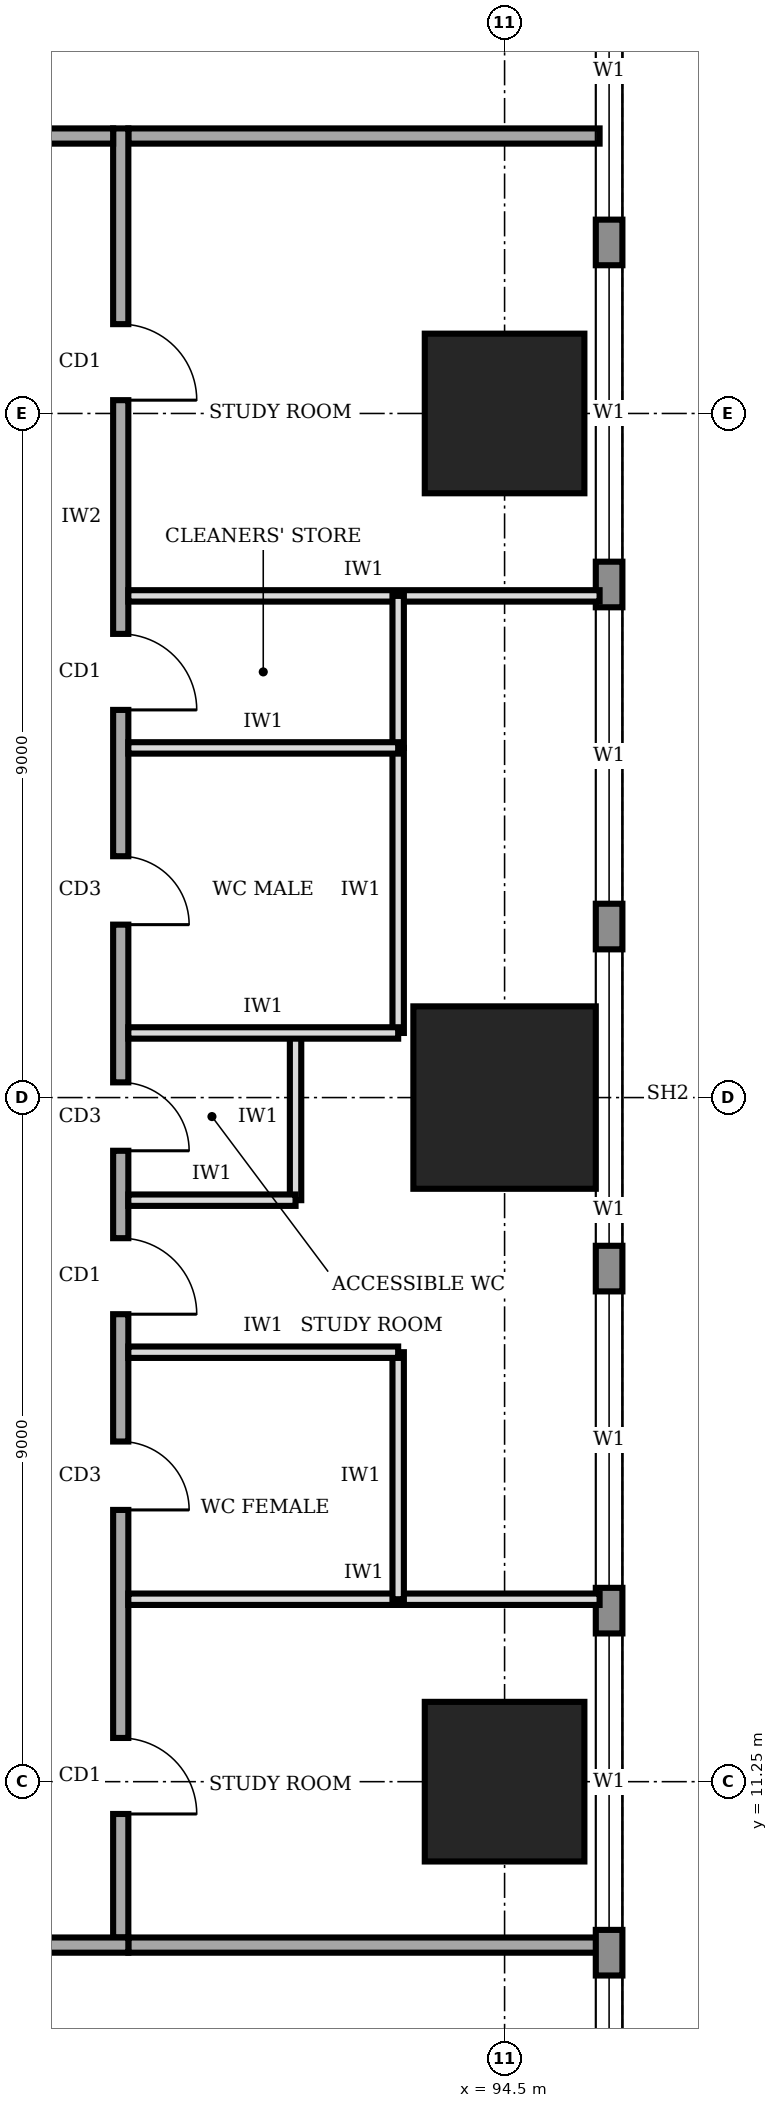
"""IFC4 building model, lengths in metres.
Left out: names, types, materials, properties, quantities, classifications, styles, units other than length and angle.
Written with IfcOpenShell. Run it as: python <this file> out.ifc"""

import sys

from ifc_helpers import new_model, si_unit, direction, frame, frame_2d, origin, origin_2d, place, context, subcontext, project, spatial, rectangle, extrude, element, fill, save


model = new_model("IFC4")
c1 = context("Model", 3, precision=1e-05, world=origin(), true_north=direction((0.0, 1.0)))
c2 = subcontext(c1, "Body", "Model", "MODEL_VIEW")
j1 = project(units=[si_unit("LENGTHUNIT", "METRE"), si_unit("PLANEANGLEUNIT", "RADIAN")], contexts=[c1])
p1 = place(None, origin())
s1 = spatial("IfcSite", under=j1, at=p1, CompositionType="ELEMENT")
p2 = place(p1, origin())
s2 = spatial("IfcBuilding", under=s1, at=p2, CompositionType="ELEMENT")
p3 = place(p2, frame((0.0, 0.0, 109.0)))
s3 = spatial("IfcBuildingStorey", under=s2, at=p3, CompositionType="ELEMENT", Elevation=109.0)
p4 = place(p3, frame((94.5, 11.25, 0.0), z_axis=(0.0, 0.0, 1.0), x_axis=(1.0, 0.0, 0.0)))
e1 = element("IfcColumn", 1, at=p4, inside=s3, PredefinedType="COLUMN", context=c2, shape_type="SweptSolid", body=[
    extrude(rectangle(XDim=2.1, YDim=2.1, at=origin_2d()), origin(), (0.0, 0.0, 1.0), 4.0),
])
p5 = place(p3, frame((94.5, 20.25, 0.0), z_axis=(0.0, 0.0, 1.0), x_axis=(1.0, 0.0, 0.0)))
e2 = element("IfcColumn", 2, at=p5, inside=s3, PredefinedType="COLUMN", context=c2, shape_type="SweptSolid", body=[
    extrude(rectangle(XDim=2.4, YDim=2.4, at=origin_2d()), origin(), (0.0, 0.0, 1.0), 4.0),
])
p6 = place(p3, frame((94.5, 29.25, 0.0), z_axis=(0.0, 0.0, 1.0), x_axis=(1.0, 0.0, 0.0)))
e3 = element("IfcColumn", 3, at=p6, inside=s3, PredefinedType="COLUMN", context=c2, shape_type="SweptSolid", body=[
    extrude(rectangle(XDim=2.1, YDim=2.1, at=origin_2d()), origin(), (0.0, 0.0, 1.0), 4.0),
])
p7 = place(p3, frame((95.875, 3.32, 0.0), z_axis=(0.0, 0.0, 1.0), x_axis=(0.0, 1.0, 0.0)))
e4 = element("IfcWall", 4, at=p7, inside=s3, PredefinedType="STANDARD", context=c2, shape_type="SweptSolid", body=[
    extrude(rectangle(XDim=33.96, YDim=0.35, at=frame_2d((16.98, 0.0))), origin(), (0.0, 0.0, 1.0), 3.75),
])
p8 = place(p7, frame((1.48, 0.0, 0.9)))
e5 = element("IfcOpeningElement", 5, at=p8, cuts=e4, PredefinedType="OPENING", context=c2, shape_type="SweptSolid", body=[
    extrude(rectangle(XDim=3.9, YDim=2.2, at=frame_2d((1.95, 1.1))), frame((0.0, 0.185, 0.0), z_axis=(0.0, -1.0, 0.0), x_axis=(1.0, 0.0, 0.0)), (0.0, 0.0, 1.0), 0.37),
])
p9 = place(p7, frame((5.98, 0.0, 0.9)))
e6 = element("IfcOpeningElement", 6, at=p9, cuts=e4, PredefinedType="OPENING", context=c2, shape_type="SweptSolid", body=[
    extrude(rectangle(XDim=3.9, YDim=2.2, at=frame_2d((1.95, 1.1))), frame((0.0, 0.185, 0.0), z_axis=(0.0, -1.0, 0.0), x_axis=(1.0, 0.0, 0.0)), (0.0, 0.0, 1.0), 0.37),
])
p10 = place(p7, frame((10.48, 0.0, 0.9)))
e7 = element("IfcOpeningElement", 7, at=p10, cuts=e4, PredefinedType="OPENING", context=c2, shape_type="SweptSolid", body=[
    extrude(rectangle(XDim=3.9, YDim=2.2, at=frame_2d((1.95, 1.1))), frame((0.0, 0.185, 0.0), z_axis=(0.0, -1.0, 0.0), x_axis=(1.0, 0.0, 0.0)), (0.0, 0.0, 1.0), 0.37),
])
p11 = place(p7, frame((14.98, 0.0, 0.9)))
e8 = element("IfcOpeningElement", 8, at=p11, cuts=e4, PredefinedType="OPENING", context=c2, shape_type="SweptSolid", body=[
    extrude(rectangle(XDim=3.9, YDim=2.2, at=frame_2d((1.95, 1.1))), frame((0.0, 0.185, 0.0), z_axis=(0.0, -1.0, 0.0), x_axis=(1.0, 0.0, 0.0)), (0.0, 0.0, 1.0), 0.37),
])
p12 = place(p7, frame((19.48, 0.0, 0.9)))
e9 = element("IfcOpeningElement", 9, at=p12, cuts=e4, PredefinedType="OPENING", context=c2, shape_type="SweptSolid", body=[
    extrude(rectangle(XDim=3.9, YDim=2.2, at=frame_2d((1.95, 1.1))), frame((0.0, 0.185, 0.0), z_axis=(0.0, -1.0, 0.0), x_axis=(1.0, 0.0, 0.0)), (0.0, 0.0, 1.0), 0.37),
])
p13 = place(p7, frame((23.98, 0.0, 0.9)))
e10 = element("IfcOpeningElement", 10, at=p13, cuts=e4, PredefinedType="OPENING", context=c2, shape_type="SweptSolid", body=[
    extrude(rectangle(XDim=3.9, YDim=2.2, at=frame_2d((1.95, 1.1))), frame((0.0, 0.185, 0.0), z_axis=(0.0, -1.0, 0.0), x_axis=(1.0, 0.0, 0.0)), (0.0, 0.0, 1.0), 0.37),
])
p14 = place(p7, frame((28.48, 0.0, 0.9)))
e11 = element("IfcOpeningElement", 11, at=p14, cuts=e4, PredefinedType="OPENING", context=c2, shape_type="SweptSolid", body=[
    extrude(rectangle(XDim=3.9, YDim=2.2, at=frame_2d((1.95, 1.1))), frame((0.0, 0.185, 0.0), z_axis=(0.0, -1.0, 0.0), x_axis=(1.0, 0.0, 0.0)), (0.0, 0.0, 1.0), 0.37),
])
p15 = place(p3, frame((72.65, 9.1, 0.0), z_axis=(0.0, 0.0, 1.0), x_axis=(1.0, 0.0, 0.0)))
e12 = element("IfcWall", 12, at=p15, inside=s3, PredefinedType="SOLIDWALL", context=c2, shape_type="SweptSolid", body=[
    extrude(rectangle(XDim=16.9, YDim=0.2, at=frame_2d((8.45, 0.0))), origin(), (0.0, 0.0, 1.0), 3.75),
])
p16 = place(p15, frame((1.325, 0.0, 0.0)))
e13 = element("IfcOpeningElement", 13, at=p16, cuts=e12, PredefinedType="OPENING", context=c2, shape_type="SweptSolid", body=[
    extrude(rectangle(XDim=1.0, YDim=2.1, at=frame_2d((0.5, 1.05))), frame((0.0, 0.11, 0.0), z_axis=(0.0, -1.0, 0.0), x_axis=(1.0, 0.0, 0.0)), (0.0, 0.0, 1.0), 0.22),
])
p17 = place(p15, frame((7.85, 0.0, 0.0)))
e14 = element("IfcOpeningElement", 14, at=p17, cuts=e12, PredefinedType="OPENING", context=c2, shape_type="SweptSolid", body=[
    extrude(rectangle(XDim=1.0, YDim=2.1, at=frame_2d((0.5, 1.05))), frame((0.0, 0.11, 0.0), z_axis=(0.0, -1.0, 0.0), x_axis=(1.0, 0.0, 0.0)), (0.0, 0.0, 1.0), 0.22),
])
p18 = place(p15, frame((14.375, 0.0, 0.0)))
e15 = element("IfcOpeningElement", 15, at=p18, cuts=e12, PredefinedType="OPENING", context=c2, shape_type="SweptSolid", body=[
    extrude(rectangle(XDim=1.0, YDim=2.1, at=frame_2d((0.5, 1.05))), frame((0.0, 0.11, 0.0), z_axis=(0.0, -1.0, 0.0), x_axis=(1.0, 0.0, 0.0)), (0.0, 0.0, 1.0), 0.22),
])
p19 = place(p3, frame((89.45, 9.2, 0.0), z_axis=(0.0, 0.0, 1.0), x_axis=(0.0, 1.0, 0.0)))
e16 = element("IfcWall", 16, at=p19, inside=s3, PredefinedType="SOLIDWALL", context=c2, shape_type="SweptSolid", body=[
    extrude(rectangle(XDim=23.8, YDim=0.2, at=frame_2d((11.9, 0.0))), origin(), (0.0, 0.0, 1.0), 3.75),
])
p20 = place(p19, frame((1.625, 0.0, 0.0)))
e17 = element("IfcOpeningElement", 17, at=p20, cuts=e16, PredefinedType="OPENING", context=c2, shape_type="SweptSolid", body=[
    extrude(rectangle(XDim=1.0, YDim=2.1, at=frame_2d((0.5, 1.05))), frame((0.0, 0.11, 0.0), z_axis=(0.0, -1.0, 0.0), x_axis=(1.0, 0.0, 0.0)), (0.0, 0.0, 1.0), 0.22),
])
p21 = place(p19, frame((5.625, 0.0, 0.0)))
e18 = element("IfcOpeningElement", 18, at=p21, cuts=e16, PredefinedType="OPENING", context=c2, shape_type="SweptSolid", body=[
    extrude(rectangle(XDim=0.9, YDim=2.1, at=frame_2d((0.45, 1.05))), frame((0.0, 0.11, 0.0), z_axis=(0.0, -1.0, 0.0), x_axis=(1.0, 0.0, 0.0)), (0.0, 0.0, 1.0), 0.22),
])
p22 = place(p19, frame((10.35, 0.0, 0.0)))
e19 = element("IfcOpeningElement", 19, at=p22, cuts=e16, PredefinedType="OPENING", context=c2, shape_type="SweptSolid", body=[
    extrude(rectangle(XDim=0.9, YDim=2.1, at=frame_2d((0.45, 1.05))), frame((0.0, 0.11, 0.0), z_axis=(0.0, -1.0, 0.0), x_axis=(1.0, 0.0, 0.0)), (0.0, 0.0, 1.0), 0.22),
])
p23 = place(p19, frame((13.325, 0.0, 0.0)))
e20 = element("IfcOpeningElement", 20, at=p23, cuts=e16, PredefinedType="OPENING", context=c2, shape_type="SweptSolid", body=[
    extrude(rectangle(XDim=0.9, YDim=2.1, at=frame_2d((0.45, 1.05))), frame((0.0, 0.11, 0.0), z_axis=(0.0, -1.0, 0.0), x_axis=(1.0, 0.0, 0.0)), (0.0, 0.0, 1.0), 0.22),
])
p24 = place(p19, frame((16.15, 0.0, 0.0)))
e21 = element("IfcOpeningElement", 21, at=p24, cuts=e16, PredefinedType="OPENING", context=c2, shape_type="SweptSolid", body=[
    extrude(rectangle(XDim=1.0, YDim=2.1, at=frame_2d((0.5, 1.05))), frame((0.0, 0.11, 0.0), z_axis=(0.0, -1.0, 0.0), x_axis=(1.0, 0.0, 0.0)), (0.0, 0.0, 1.0), 0.22),
])
p25 = place(p19, frame((8.2, 0.0, 0.0)))
e22 = element("IfcOpeningElement", 22, at=p25, cuts=e16, PredefinedType="OPENING", context=c2, shape_type="SweptSolid", body=[
    extrude(rectangle(XDim=1.0, YDim=2.1, at=frame_2d((0.5, 1.05))), frame((0.0, 0.11, 0.0), z_axis=(0.0, -1.0, 0.0), x_axis=(1.0, 0.0, 0.0)), (0.0, 0.0, 1.0), 0.22),
])
p26 = place(p19, frame((20.225, 0.0, 0.0)))
e23 = element("IfcOpeningElement", 23, at=p26, cuts=e16, PredefinedType="OPENING", context=c2, shape_type="SweptSolid", body=[
    extrude(rectangle(XDim=1.0, YDim=2.1, at=frame_2d((0.5, 1.05))), frame((0.0, 0.11, 0.0), z_axis=(0.0, -1.0, 0.0), x_axis=(1.0, 0.0, 0.0)), (0.0, 0.0, 1.0), 0.22),
])
p27 = place(p3, frame((89.35, 32.9, 0.0), z_axis=(0.0, 0.0, 1.0), x_axis=(-1.0, 0.0, 0.0)))
e24 = element("IfcWall", 24, at=p27, inside=s3, PredefinedType="SOLIDWALL", context=c2, shape_type="SweptSolid", body=[
    extrude(rectangle(XDim=16.9, YDim=0.2, at=frame_2d((8.45, 0.0))), origin(), (0.0, 0.0, 1.0), 3.75),
])
p28 = place(p27, frame((14.375, 0.0, 0.0)))
e25 = element("IfcOpeningElement", 25, at=p28, cuts=e24, PredefinedType="OPENING", context=c2, shape_type="SweptSolid", body=[
    extrude(rectangle(XDim=1.0, YDim=2.1, at=frame_2d((0.5, 1.05))), frame((0.0, 0.11, 0.0), z_axis=(0.0, -1.0, 0.0), x_axis=(1.0, 0.0, 0.0)), (0.0, 0.0, 1.0), 0.22),
])
p29 = place(p27, frame((7.85, 0.0, 0.0)))
e26 = element("IfcOpeningElement", 26, at=p29, cuts=e24, PredefinedType="OPENING", context=c2, shape_type="SweptSolid", body=[
    extrude(rectangle(XDim=1.0, YDim=2.1, at=frame_2d((0.5, 1.05))), frame((0.0, 0.11, 0.0), z_axis=(0.0, -1.0, 0.0), x_axis=(1.0, 0.0, 0.0)), (0.0, 0.0, 1.0), 0.22),
])
p30 = place(p27, frame((1.325, 0.0, 0.0)))
e27 = element("IfcOpeningElement", 27, at=p30, cuts=e24, PredefinedType="OPENING", context=c2, shape_type="SweptSolid", body=[
    extrude(rectangle(XDim=1.0, YDim=2.1, at=frame_2d((0.5, 1.05))), frame((0.0, 0.11, 0.0), z_axis=(0.0, -1.0, 0.0), x_axis=(1.0, 0.0, 0.0)), (0.0, 0.0, 1.0), 0.22),
])
for number, where, z_axis, x_axis in (
    (28, (89.55, 9.1, 0.0), (0.0, 0.0, 1.0), (1.0, 0.0, 0.0)),
    (29, (89.55, 32.9, 0.0), (0.0, 0.0, 1.0), (1.0, 0.0, 0.0)),
):
    element("IfcWall", number, at=place(p3, frame(where, z_axis=z_axis, x_axis=x_axis)), inside=s3, PredefinedType="SOLIDWALL", context=c2, shape_type="SweptSolid", body=[
        extrude(rectangle(XDim=6.2, YDim=0.2, at=frame_2d((3.1, 0.0))), origin(), (0.0, 0.0, 1.0), 3.75),
    ])
for number, where, z_axis, x_axis in (
    (30, (89.55, 13.65, 0.0), (0.0, 0.0, 1.0), (1.0, 0.0, 0.0)),
    (31, (89.55, 26.85, 0.0), (0.0, 0.0, 1.0), (1.0, 0.0, 0.0)),
):
    element("IfcWall", number, at=place(p3, frame(where, z_axis=z_axis, x_axis=x_axis)), inside=s3, PredefinedType="PARTITIONING", context=c2, shape_type="SweptSolid", body=[
        extrude(rectangle(XDim=6.2, YDim=0.15, at=frame_2d((3.1, 0.0))), origin(), (0.0, 0.0, 1.0), 3.75),
    ])
p31 = place(p3, frame((89.55, 16.9, 0.0), z_axis=(0.0, 0.0, 1.0), x_axis=(1.0, 0.0, 0.0)))
e32 = element("IfcWall", 32, at=p31, inside=s3, PredefinedType="PARTITIONING", context=c2, shape_type="SweptSolid", body=[
    extrude(rectangle(XDim=3.55, YDim=0.15, at=frame_2d((1.775, 0.0))), origin(), (0.0, 0.0, 1.0), 3.75),
])
p32 = place(p3, frame((89.55, 18.9, 0.0), z_axis=(0.0, 0.0, 1.0), x_axis=(1.0, 0.0, 0.0)))
e33 = element("IfcWall", 33, at=p32, inside=s3, PredefinedType="PARTITIONING", context=c2, shape_type="SweptSolid", body=[
    extrude(rectangle(XDim=2.2, YDim=0.15, at=frame_2d((1.1, 0.0))), origin(), (0.0, 0.0, 1.0), 3.75),
])
p33 = place(p3, frame((89.55, 21.1, 0.0), z_axis=(0.0, 0.0, 1.0), x_axis=(1.0, 0.0, 0.0)))
e34 = element("IfcWall", 34, at=p33, inside=s3, PredefinedType="PARTITIONING", context=c2, shape_type="SweptSolid", body=[
    extrude(rectangle(XDim=3.55, YDim=0.15, at=frame_2d((1.775, 0.0))), origin(), (0.0, 0.0, 1.0), 2.85),
])
p34 = place(p3, frame((89.55, 24.85, 0.0), z_axis=(0.0, 0.0, 1.0), x_axis=(1.0, 0.0, 0.0)))
e35 = element("IfcWall", 35, at=p34, inside=s3, PredefinedType="PARTITIONING", context=c2, shape_type="SweptSolid", body=[
    extrude(rectangle(XDim=3.55, YDim=0.15, at=frame_2d((1.775, 0.0))), origin(), (0.0, 0.0, 1.0), 3.75),
])
p35 = place(p3, frame((93.1, 13.65, 0.0), z_axis=(0.0, 0.0, 1.0), x_axis=(0.0, 1.0, 0.0)))
e36 = element("IfcWall", 36, at=p35, inside=s3, PredefinedType="PARTITIONING", context=c2, shape_type="SweptSolid", body=[
    extrude(rectangle(XDim=3.25, YDim=0.15, at=frame_2d((1.625, 0.0))), origin(), (0.0, 0.0, 1.0), 3.75),
])
p36 = place(p3, frame((91.75, 18.9, 0.0), z_axis=(0.0, 0.0, 1.0), x_axis=(0.0, 1.0, 0.0)))
e37 = element("IfcWall", 37, at=p36, inside=s3, PredefinedType="PARTITIONING", context=c2, shape_type="SweptSolid", body=[
    extrude(rectangle(XDim=2.2, YDim=0.15, at=frame_2d((1.1, 0.0))), origin(), (0.0, 0.0, 1.0), 3.75),
])
p37 = place(p3, frame((93.1, 21.1, 0.0), z_axis=(0.0, 0.0, 1.0), x_axis=(0.0, 1.0, 0.0)))
e38 = element("IfcWall", 38, at=p37, inside=s3, PredefinedType="PARTITIONING", context=c2, shape_type="SweptSolid", body=[
    extrude(rectangle(XDim=3.75, YDim=0.15, at=frame_2d((1.875, 0.0))), origin(), (0.0, 0.0, 1.0), 3.75),
])
p38 = place(p3, frame((93.1, 24.85, 0.0), z_axis=(0.0, 0.0, 1.0), x_axis=(0.0, 1.0, 0.0)))
e39 = element("IfcWall", 39, at=p38, inside=s3, PredefinedType="PARTITIONING", context=c2, shape_type="SweptSolid", body=[
    extrude(rectangle(XDim=2.0, YDim=0.15, at=frame_2d((1.0, 0.0))), origin(), (0.0, 0.0, 1.0), 3.75),
])
p39 = place(p8, origin())
e40 = element("IfcWindow", 40, at=p39, inside=s3, PartitioningType="SINGLE_PANEL", PredefinedType="WINDOW", context=c2, shape_type="SweptSolid", body=[
    extrude(rectangle(XDim=3.9, YDim=2.2, at=frame_2d((1.95, 1.1))), frame((0.0, 0.03, 0.0), z_axis=(0.0, -1.0, 0.0), x_axis=(1.0, 0.0, 0.0)), (0.0, 0.0, 1.0), 0.06),
])
fill(e5, e40)
p40 = place(p9, origin())
e41 = element("IfcWindow", 41, at=p40, inside=s3, PartitioningType="SINGLE_PANEL", PredefinedType="WINDOW", context=c2, shape_type="SweptSolid", body=[
    extrude(rectangle(XDim=3.9, YDim=2.2, at=frame_2d((1.95, 1.1))), frame((0.0, 0.03, 0.0), z_axis=(0.0, -1.0, 0.0), x_axis=(1.0, 0.0, 0.0)), (0.0, 0.0, 1.0), 0.06),
])
fill(e6, e41)
p41 = place(p10, origin())
e42 = element("IfcWindow", 42, at=p41, inside=s3, PartitioningType="SINGLE_PANEL", PredefinedType="WINDOW", context=c2, shape_type="SweptSolid", body=[
    extrude(rectangle(XDim=3.9, YDim=2.2, at=frame_2d((1.95, 1.1))), frame((0.0, 0.03, 0.0), z_axis=(0.0, -1.0, 0.0), x_axis=(1.0, 0.0, 0.0)), (0.0, 0.0, 1.0), 0.06),
])
fill(e7, e42)
p42 = place(p11, origin())
e43 = element("IfcWindow", 43, at=p42, inside=s3, PartitioningType="SINGLE_PANEL", PredefinedType="WINDOW", context=c2, shape_type="SweptSolid", body=[
    extrude(rectangle(XDim=3.9, YDim=2.2, at=frame_2d((1.95, 1.1))), frame((0.0, 0.03, 0.0), z_axis=(0.0, -1.0, 0.0), x_axis=(1.0, 0.0, 0.0)), (0.0, 0.0, 1.0), 0.06),
])
fill(e8, e43)
p43 = place(p12, origin())
e44 = element("IfcWindow", 44, at=p43, inside=s3, PartitioningType="SINGLE_PANEL", PredefinedType="WINDOW", context=c2, shape_type="SweptSolid", body=[
    extrude(rectangle(XDim=3.9, YDim=2.2, at=frame_2d((1.95, 1.1))), frame((0.0, 0.03, 0.0), z_axis=(0.0, -1.0, 0.0), x_axis=(1.0, 0.0, 0.0)), (0.0, 0.0, 1.0), 0.06),
])
fill(e9, e44)
p44 = place(p13, origin())
e45 = element("IfcWindow", 45, at=p44, inside=s3, PartitioningType="SINGLE_PANEL", PredefinedType="WINDOW", context=c2, shape_type="SweptSolid", body=[
    extrude(rectangle(XDim=3.9, YDim=2.2, at=frame_2d((1.95, 1.1))), frame((0.0, 0.03, 0.0), z_axis=(0.0, -1.0, 0.0), x_axis=(1.0, 0.0, 0.0)), (0.0, 0.0, 1.0), 0.06),
])
fill(e10, e45)
p45 = place(p14, origin())
e46 = element("IfcWindow", 46, at=p45, inside=s3, PartitioningType="SINGLE_PANEL", PredefinedType="WINDOW", context=c2, shape_type="SweptSolid", body=[
    extrude(rectangle(XDim=3.9, YDim=2.2, at=frame_2d((1.95, 1.1))), frame((0.0, 0.03, 0.0), z_axis=(0.0, -1.0, 0.0), x_axis=(1.0, 0.0, 0.0)), (0.0, 0.0, 1.0), 0.06),
])
fill(e11, e46)
p46 = place(p20, frame((1.0, 0.0, 0.0), z_axis=(0.0, 0.0, 1.0), x_axis=(-1.0, 0.0, 0.0)))
e47 = element("IfcDoor", 47, at=p46, inside=s3, OperationType="SINGLE_SWING_RIGHT", PredefinedType="DOOR", context=c2, shape_type="SweptSolid", body=[
    extrude(rectangle(XDim=1.0, YDim=2.1, at=frame_2d((0.5, 1.05))), frame((0.0, 0.025, 0.0), z_axis=(0.0, -1.0, 0.0), x_axis=(1.0, 0.0, 0.0)), (0.0, 0.0, 1.0), 0.05),
])
fill(e17, e47)
p47 = place(p21, frame((0.9, 0.0, 0.0), z_axis=(0.0, 0.0, 1.0), x_axis=(-1.0, 0.0, 0.0)))
e48 = element("IfcDoor", 48, at=p47, inside=s3, OperationType="SINGLE_SWING_RIGHT", PredefinedType="DOOR", context=c2, shape_type="SweptSolid", body=[
    extrude(rectangle(XDim=0.9, YDim=2.1, at=frame_2d((0.45, 1.05))), frame((0.0, 0.025, 0.0), z_axis=(0.0, -1.0, 0.0), x_axis=(1.0, 0.0, 0.0)), (0.0, 0.0, 1.0), 0.05),
])
fill(e18, e48)
p48 = place(p22, frame((0.9, 0.0, 0.0), z_axis=(0.0, 0.0, 1.0), x_axis=(-1.0, 0.0, 0.0)))
e49 = element("IfcDoor", 49, at=p48, inside=s3, OperationType="SINGLE_SWING_RIGHT", PredefinedType="DOOR", context=c2, shape_type="SweptSolid", body=[
    extrude(rectangle(XDim=0.9, YDim=2.1, at=frame_2d((0.45, 1.05))), frame((0.0, 0.025, 0.0), z_axis=(0.0, -1.0, 0.0), x_axis=(1.0, 0.0, 0.0)), (0.0, 0.0, 1.0), 0.05),
])
fill(e19, e49)
p49 = place(p23, frame((0.9, 0.0, 0.0), z_axis=(0.0, 0.0, 1.0), x_axis=(-1.0, 0.0, 0.0)))
e50 = element("IfcDoor", 50, at=p49, inside=s3, OperationType="SINGLE_SWING_RIGHT", PredefinedType="DOOR", context=c2, shape_type="SweptSolid", body=[
    extrude(rectangle(XDim=0.9, YDim=2.1, at=frame_2d((0.45, 1.05))), frame((0.0, 0.025, 0.0), z_axis=(0.0, -1.0, 0.0), x_axis=(1.0, 0.0, 0.0)), (0.0, 0.0, 1.0), 0.05),
])
fill(e20, e50)
p50 = place(p24, frame((1.0, 0.0, 0.0), z_axis=(0.0, 0.0, 1.0), x_axis=(-1.0, 0.0, 0.0)))
e51 = element("IfcDoor", 51, at=p50, inside=s3, OperationType="SINGLE_SWING_RIGHT", PredefinedType="DOOR", context=c2, shape_type="SweptSolid", body=[
    extrude(rectangle(XDim=1.0, YDim=2.1, at=frame_2d((0.5, 1.05))), frame((0.0, 0.025, 0.0), z_axis=(0.0, -1.0, 0.0), x_axis=(1.0, 0.0, 0.0)), (0.0, 0.0, 1.0), 0.05),
])
fill(e21, e51)
p51 = place(p25, frame((1.0, 0.0, 0.0), z_axis=(0.0, 0.0, 1.0), x_axis=(-1.0, 0.0, 0.0)))
e52 = element("IfcDoor", 52, at=p51, inside=s3, OperationType="SINGLE_SWING_RIGHT", PredefinedType="DOOR", context=c2, shape_type="SweptSolid", body=[
    extrude(rectangle(XDim=1.0, YDim=2.1, at=frame_2d((0.5, 1.05))), frame((0.0, 0.025, 0.0), z_axis=(0.0, -1.0, 0.0), x_axis=(1.0, 0.0, 0.0)), (0.0, 0.0, 1.0), 0.05),
])
fill(e22, e52)
p52 = place(p26, frame((1.0, 0.0, 0.0), z_axis=(0.0, 0.0, 1.0), x_axis=(-1.0, 0.0, 0.0)))
e53 = element("IfcDoor", 53, at=p52, inside=s3, OperationType="SINGLE_SWING_RIGHT", PredefinedType="DOOR", context=c2, shape_type="SweptSolid", body=[
    extrude(rectangle(XDim=1.0, YDim=2.1, at=frame_2d((0.5, 1.05))), frame((0.0, 0.025, 0.0), z_axis=(0.0, -1.0, 0.0), x_axis=(1.0, 0.0, 0.0)), (0.0, 0.0, 1.0), 0.05),
])
fill(e23, e53)
save(model, sys.argv[1])
